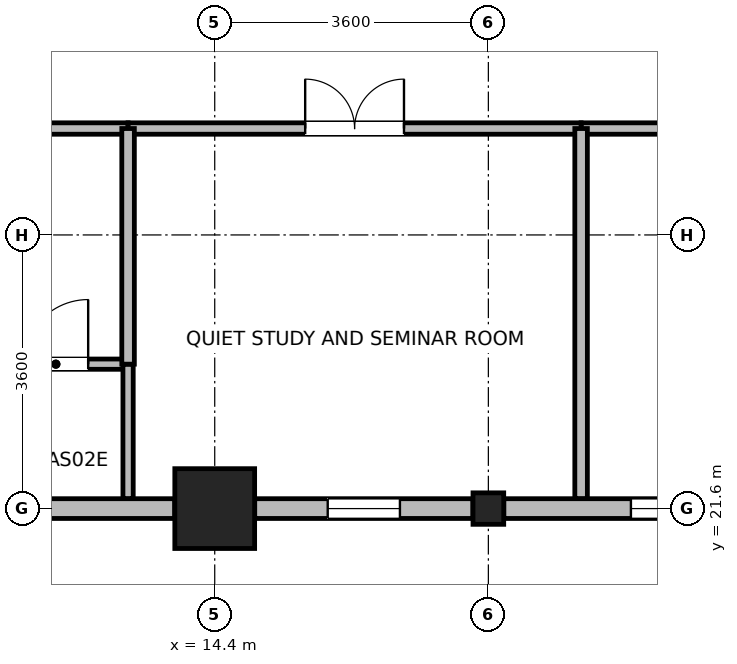
"""IFC4 building model, lengths in metres.
Left out: names, types, materials, properties, quantities, classifications, styles, units other than length and angle.
Written with IfcOpenShell. Run it as: python <this file> out.ifc"""

import sys

from ifc_helpers import new_model, si_unit, direction, frame, frame_2d, origin, origin_2d, place, context, subcontext, project, spatial, rectangle, i_section, extrude, source, transform, mapped, element, fill, save


model = new_model("IFC4")
c1 = context("Model", 3, precision=1e-05, world=origin(), true_north=direction((0.0, 1.0)))
c2 = subcontext(c1, "Body", "Model", "MODEL_VIEW")
j1 = project(units=[si_unit("LENGTHUNIT", "METRE"), si_unit("PLANEANGLEUNIT", "RADIAN")], contexts=[c1])
p1 = place(None, origin())
s1 = spatial("IfcSite", under=j1, at=p1, CompositionType="ELEMENT")
p2 = place(p1, origin())
s2 = spatial("IfcBuilding", under=s1, at=p2, CompositionType="ELEMENT")
p3 = place(p2, frame((0.0, 0.0, 147.6)))
s3 = spatial("IfcBuildingStorey", under=s2, at=p3, CompositionType="ELEMENT", Elevation=147.6)
m1 = source(origin(), c2, "Body", "SweptSolid", [
    extrude(rectangle(XDim=1.05, YDim=1.05, at=origin_2d()), origin(), (0.0, 0.0, 1.0), 3.7),
])
p4 = place(p3, frame((14.4, 21.6, 0.0), z_axis=(0.0, 0.0, 1.0), x_axis=(1.0, 0.0, 0.0)))
e1 = element("IfcColumn", 1, at=p4, inside=s3, PredefinedType="COLUMN", context=c2, shape_type="MappedRepresentation", body=[
    mapped(m1, transform((0.0, 0.0, 0.0), x_axis=(1.0, 0.0, 0.0), y_axis=(0.0, 1.0, 0.0), z_axis=(0.0, 0.0, 1.0), scale=1.0)),
])
m2 = source(origin(), c2, "Body", "SweptSolid", [
    extrude(i_section(OverallWidth=0.404, OverallDepth=0.414, WebThickness=0.021, FlangeThickness=0.028, FilletRadius=0.015, at=origin_2d()), origin(), (0.0, 0.0, 1.0), 3.7),
])
p5 = place(p3, frame((18.0, 21.6, 0.0), z_axis=(0.0, 0.0, 1.0), x_axis=(1.0, 0.0, 0.0)))
e2 = element("IfcColumn", 2, at=p5, inside=s3, PredefinedType="COLUMN", context=c2, shape_type="MappedRepresentation", body=[
    mapped(m2, transform((0.0, 0.0, 0.0), x_axis=(1.0, 0.0, 0.0), y_axis=(0.0, 1.0, 0.0), z_axis=(0.0, 0.0, 1.0), scale=1.0)),
])
p6 = place(p3, frame((13.874, 21.6, 0.0), z_axis=(0.0, 0.0, 1.0), x_axis=(-1.0, 0.0, 0.0)))
e3 = element("IfcWall", 3, at=p6, inside=s3, PredefinedType="STANDARD", context=c2, shape_type="SweptSolid", body=[
    extrude(rectangle(XDim=13.239, YDim=0.26, at=frame_2d((6.62, 0.0))), origin(), (0.0, 0.0, 1.0), 3.44),
])
p7 = place(p6, frame((4.065, 0.0, 0.85)))
e4 = element("IfcOpeningElement", 4, at=p7, cuts=e3, PredefinedType="OPENING", context=c2, shape_type="SweptSolid", body=[
    extrude(rectangle(XDim=1.8, YDim=1.85, at=frame_2d((0.9, 0.925))), frame((0.0, 0.14, 0.0), z_axis=(0.0, -1.0, 0.0), x_axis=(1.0, 0.0, 0.0)), (0.0, 0.0, 1.0), 0.28),
])
p8 = place(p6, frame((10.684, 0.0, 0.85)))
e5 = element("IfcOpeningElement", 5, at=p8, cuts=e3, PredefinedType="OPENING", context=c2, shape_type="SweptSolid", body=[
    extrude(rectangle(XDim=1.8, YDim=1.85, at=frame_2d((0.9, 0.925))), frame((0.0, 0.14, 0.0), z_axis=(0.0, -1.0, 0.0), x_axis=(1.0, 0.0, 0.0)), (0.0, 0.0, 1.0), 0.28),
])
p9 = place(p3, frame((17.797, 21.6, 0.0), z_axis=(0.0, 0.0, 1.0), x_axis=(-1.0, 0.0, 0.0)))
e6 = element("IfcWall", 6, at=p9, inside=s3, PredefinedType="STANDARD", context=c2, shape_type="SweptSolid", body=[
    extrude(rectangle(XDim=2.871, YDim=0.26, at=frame_2d((1.436, 0.0))), origin(), (0.0, 0.0, 1.0), 2.99),
])
p10 = place(p9, frame((0.96, 0.0, 0.85)))
e7 = element("IfcOpeningElement", 7, at=p10, cuts=e6, PredefinedType="OPENING", context=c2, shape_type="SweptSolid", body=[
    extrude(rectangle(XDim=0.95, YDim=1.75, at=frame_2d((0.475, 0.875))), frame((0.0, 0.14, 0.0), z_axis=(0.0, -1.0, 0.0), x_axis=(1.0, 0.0, 0.0)), (0.0, 0.0, 1.0), 0.28),
])
p11 = place(p3, frame((21.074, 21.6, 0.0), z_axis=(0.0, 0.0, 1.0), x_axis=(-1.0, 0.0, 0.0)))
e8 = element("IfcWall", 8, at=p11, inside=s3, PredefinedType="STANDARD", context=c2, shape_type="SweptSolid", body=[
    extrude(rectangle(XDim=2.871, YDim=0.26, at=frame_2d((1.436, 0.0))), origin(), (0.0, 0.0, 1.0), 2.99),
])
p12 = place(p11, frame((0.249, 0.0, 0.85)))
e9 = element("IfcOpeningElement", 9, at=p12, cuts=e8, PredefinedType="OPENING", context=c2, shape_type="SweptSolid", body=[
    extrude(rectangle(XDim=0.95, YDim=1.75, at=frame_2d((0.475, 0.875))), frame((0.0, 0.14, 0.0), z_axis=(0.0, -1.0, 0.0), x_axis=(1.0, 0.0, 0.0)), (0.0, 0.0, 1.0), 0.28),
])
p13 = place(p3, frame((11.36, 23.5, 0.0), z_axis=(0.0, 0.0, 1.0), x_axis=(1.0, 0.0, 0.0)))
e10 = element("IfcWall", 10, at=p13, inside=s3, PredefinedType="PARTITIONING", context=c2, shape_type="SweptSolid", body=[
    extrude(rectangle(XDim=1.9, YDim=0.135, at=frame_2d((0.95, 0.0))), origin(), (0.0, 0.0, 1.0), 3.44),
])
p14 = place(p13, frame((0.525, 0.0, 0.0)))
e11 = element("IfcOpeningElement", 11, at=p14, cuts=e10, PredefinedType="OPENING", context=c2, shape_type="SweptSolid", body=[
    extrude(rectangle(XDim=0.85, YDim=2.04, at=frame_2d((0.425, 1.02))), frame((0.0, 0.078, 0.0), z_axis=(0.0, -1.0, 0.0), x_axis=(1.0, 0.0, 0.0)), (0.0, 0.0, 1.0), 0.155),
])
p15 = place(p3, frame((13.26, 21.732, 0.0), z_axis=(0.0, 0.0, 1.0), x_axis=(0.0, 1.0, 0.0)))
e12 = element("IfcWall", 12, at=p15, inside=s3, PredefinedType="PARTITIONING", context=c2, shape_type="SweptSolid", body=[
    extrude(rectangle(XDim=1.768, YDim=0.135, at=frame_2d((0.884, 0.0))), origin(), (0.0, 0.0, 1.0), 3.44),
])
p16 = place(p3, frame((19.22, 26.6, 0.0), z_axis=(0.0, 0.0, 1.0), x_axis=(1.0, 0.0, 0.0)))
e13 = element("IfcWall", 13, at=p16, inside=s3, PredefinedType="PARTITIONING", context=c2, shape_type="SweptSolid", body=[
    extrude(rectangle(XDim=11.34, YDim=0.15, at=frame_2d((5.67, 0.0))), origin(), (0.0, 0.0, 1.0), 3.44),
])
p17 = place(p16, frame((5.02, 0.0, 0.0)))
e14 = element("IfcOpeningElement", 14, at=p17, cuts=e13, PredefinedType="OPENING", context=c2, shape_type="SweptSolid", body=[
    extrude(rectangle(XDim=1.3, YDim=2.12, at=frame_2d((0.65, 1.06))), frame((0.0, 0.085, 0.0), z_axis=(0.0, -1.0, 0.0), x_axis=(1.0, 0.0, 0.0)), (0.0, 0.0, 1.0), 0.17),
])
p18 = place(p3, frame((6.72, 26.6, 0.0), z_axis=(0.0, 0.0, 1.0), x_axis=(1.0, 0.0, 0.0)))
e15 = element("IfcWall", 15, at=p18, inside=s3, PredefinedType="PARTITIONING", context=c2, shape_type="SweptSolid", body=[
    extrude(rectangle(XDim=6.54, YDim=0.15, at=frame_2d((3.27, 0.0))), origin(), (0.0, 0.0, 1.0), 3.44),
])
p19 = place(p18, frame((2.795, 0.0, 0.0)))
e16 = element("IfcOpeningElement", 16, at=p19, cuts=e15, PredefinedType="OPENING", context=c2, shape_type="SweptSolid", body=[
    extrude(rectangle(XDim=0.95, YDim=2.1, at=frame_2d((0.475, 1.05))), frame((0.0, 0.085, 0.0), z_axis=(0.0, -1.0, 0.0), x_axis=(1.0, 0.0, 0.0)), (0.0, 0.0, 1.0), 0.17),
])
p20 = place(p3, frame((13.26, 26.6, 0.0), z_axis=(0.0, 0.0, 1.0), x_axis=(1.0, 0.0, 0.0)))
e17 = element("IfcWall", 17, at=p20, inside=s3, PredefinedType="PARTITIONING", context=c2, shape_type="SweptSolid", body=[
    extrude(rectangle(XDim=5.96, YDim=0.15, at=frame_2d((2.98, 0.0))), origin(), (0.0, 0.0, 1.0), 3.44),
])
p21 = place(p20, frame((2.33, 0.0, 0.0)))
e18 = element("IfcOpeningElement", 18, at=p21, cuts=e17, PredefinedType="OPENING", context=c2, shape_type="SweptSolid", body=[
    extrude(rectangle(XDim=1.3, YDim=2.12, at=frame_2d((0.65, 1.06))), frame((0.0, 0.085, 0.0), z_axis=(0.0, -1.0, 0.0), x_axis=(1.0, 0.0, 0.0)), (0.0, 0.0, 1.0), 0.17),
])
p22 = place(p3, frame((19.22, 21.732, 0.0), z_axis=(0.0, 0.0, 1.0), x_axis=(0.0, 1.0, 0.0)))
e19 = element("IfcWall", 19, at=p22, inside=s3, PredefinedType="PARTITIONING", context=c2, shape_type="SweptSolid", body=[
    extrude(rectangle(XDim=4.868, YDim=0.165, at=frame_2d((2.434, 0.0))), origin(), (0.0, 0.0, 1.0), 3.44),
])
p23 = place(p3, frame((13.26, 23.5, 0.0), z_axis=(0.0, 0.0, 1.0), x_axis=(0.0, 1.0, 0.0)))
e20 = element("IfcWall", 20, at=p23, inside=s3, PredefinedType="PARTITIONING", context=c2, shape_type="SweptSolid", body=[
    extrude(rectangle(XDim=3.1, YDim=0.165, at=frame_2d((1.55, 0.0))), origin(), (0.0, 0.0, 1.0), 3.44),
])
p24 = place(p10, origin())
e21 = element("IfcWindow", 21, at=p24, inside=s3, PartitioningType="SINGLE_PANEL", PredefinedType="WINDOW", context=c2, shape_type="SweptSolid", body=[
    extrude(rectangle(XDim=0.95, YDim=1.75, at=frame_2d((0.475, 0.875))), frame((0.0, 0.03, 0.0), z_axis=(0.0, -1.0, 0.0), x_axis=(1.0, 0.0, 0.0)), (0.0, 0.0, 1.0), 0.06),
])
fill(e7, e21)
p25 = place(p12, origin())
e22 = element("IfcWindow", 22, at=p25, inside=s3, PartitioningType="SINGLE_PANEL", PredefinedType="WINDOW", context=c2, shape_type="SweptSolid", body=[
    extrude(rectangle(XDim=0.95, YDim=1.75, at=frame_2d((0.475, 0.875))), frame((0.0, 0.03, 0.0), z_axis=(0.0, -1.0, 0.0), x_axis=(1.0, 0.0, 0.0)), (0.0, 0.0, 1.0), 0.06),
])
fill(e9, e22)
p26 = place(p14, origin())
e23 = element("IfcDoor", 23, at=p26, inside=s3, OperationType="SINGLE_SWING_RIGHT", PredefinedType="DOOR", context=c2, shape_type="SweptSolid", body=[
    extrude(rectangle(XDim=0.85, YDim=2.04, at=frame_2d((0.425, 1.02))), frame((0.0, 0.025, 0.0), z_axis=(0.0, -1.0, 0.0), x_axis=(1.0, 0.0, 0.0)), (0.0, 0.0, 1.0), 0.05),
])
fill(e11, e23)
p27 = place(p21, origin())
e24 = element("IfcDoor", 24, at=p27, inside=s3, OperationType="DOUBLE_DOOR_SINGLE_SWING", PredefinedType="DOOR", context=c2, shape_type="SweptSolid", body=[
    extrude(rectangle(XDim=1.3, YDim=2.12, at=frame_2d((0.65, 1.06))), frame((0.0, 0.025, 0.0), z_axis=(0.0, -1.0, 0.0), x_axis=(1.0, 0.0, 0.0)), (0.0, 0.0, 1.0), 0.05),
])
fill(e18, e24)
save(model, sys.argv[1])
